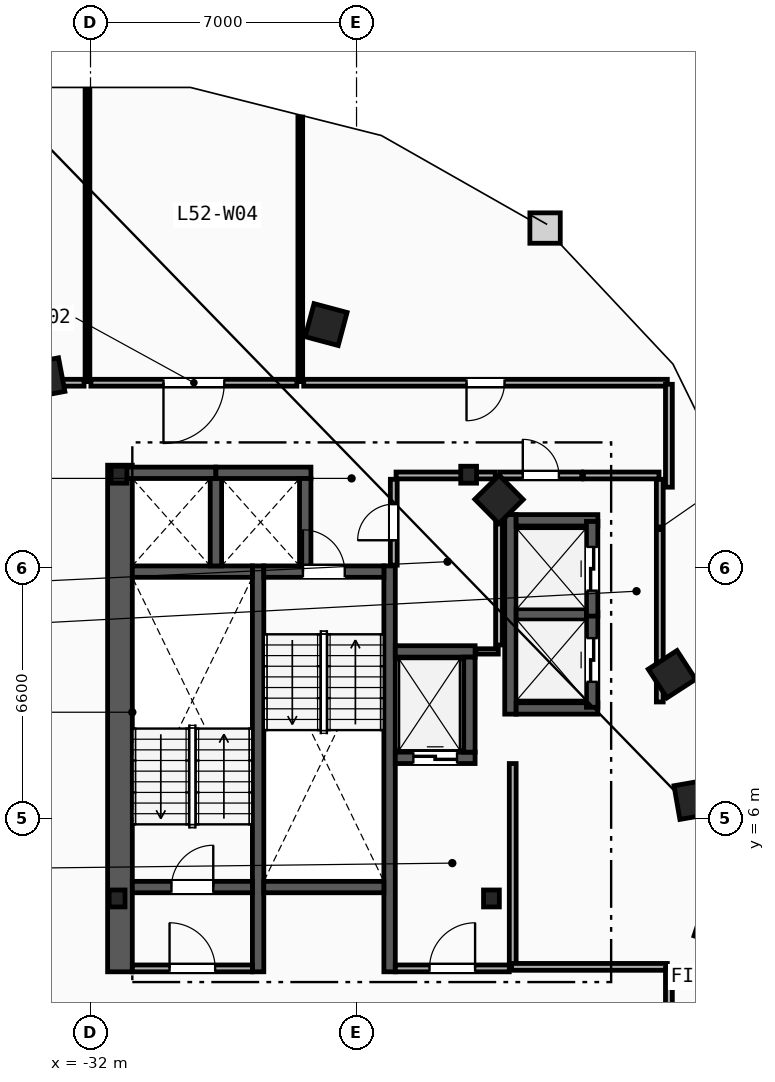
"""IFC4 building model, lengths in metres.
Left out: names, types, materials, properties, quantities, classifications, styles, units other than length and angle.
Written with IfcOpenShell. Run it as: python <this file> out.ifc"""

import sys

from ifc_helpers import new_model, si_unit, direction, frame, frame_2d, origin, origin_2d, place, context, subcontext, project, spatial, rectangle, i_section, extrude, element, fill, save


model = new_model("IFC4")
c1 = context("Model", 3, precision=1e-05, world=origin(), true_north=direction((0.0, 1.0)))
c2 = subcontext(c1, "Body", "Model", "MODEL_VIEW")
j1 = project(units=[si_unit("LENGTHUNIT", "METRE"), si_unit("PLANEANGLEUNIT", "RADIAN")], contexts=[c1])
p1 = place(None, origin())
s1 = spatial("IfcSite", under=j1, at=p1, CompositionType="ELEMENT")
p2 = place(p1, origin())
s2 = spatial("IfcBuilding", under=s1, at=p2, CompositionType="ELEMENT")
p3 = place(p2, frame((0.0, 0.0, 199.0)))
s3 = spatial("IfcBuildingStorey", under=s2, at=p3, CompositionType="ELEMENT", Elevation=199.0)
for number, where, z_axis, x_axis in (
    (1, (-31.3, 3.9, 0.0), (0.0, 0.0, 1.0), (1.0, 0.0, 0.0)),
    (2, (-21.45, 3.9, 0.0), (0.0, 0.0, 1.0), (1.0, 0.0, 0.0)),
    (3, (-22.05, 15.05, 0.0), (0.0, 0.0, 1.0), (1.0, 0.0, 0.0)),
    (4, (-31.25, 15.05, 0.0), (0.0, 0.0, 1.0), (1.0, 0.0, 0.0)),
):
    element("IfcColumn", number, at=place(p3, frame(where, z_axis=z_axis, x_axis=x_axis)), inside=s3, PredefinedType="COLUMN", context=c2, shape_type="SweptSolid", body=[
        extrude(i_section(OverallWidth=0.416, OverallDepth=0.446, WebThickness=0.039, FlangeThickness=0.063, FilletRadius=0.018, at=origin_2d()), origin(), (0.0, 0.0, 1.0), 3.6),
    ])
for number, where, z_axis, x_axis in (
    (5, (-15.55, 3.2, 0.0), (0.0, 0.0, 1.0), (0.315, 0.949, 0.0)),
    (6, (-16.125, 6.5, 0.0), (0.0, 0.0, 1.0), (-0.172, 0.985, 0.0)),
    (7, (-16.7, 9.8, 0.0), (0.0, 0.0, 1.0), (-0.544, 0.839, 0.0)),
    (8, (-21.25, 14.4, 0.0), (0.0, 0.0, 1.0), (-0.703, 0.711, 0.0)),
    (9, (-25.8, 19.0, 0.0), (0.0, 0.0, 1.0), (-0.966, 0.259, 0.0)),
    (10, (-33.2, 17.6, 0.0), (0.0, 0.0, 1.0), (-0.983, -0.186, 0.0)),
):
    element("IfcColumn", number, at=place(p3, frame(where, z_axis=z_axis, x_axis=x_axis)), inside=s3, PredefinedType="COLUMN", context=c2, shape_type="SweptSolid", body=[
        extrude(rectangle(XDim=0.9, YDim=0.9, at=origin_2d()), origin(), (0.0, 0.0, 1.0), 3.6),
    ])
p4 = place(p3, frame((-31.225, 1.97, 0.0), z_axis=(0.0, 0.0, 1.0), x_axis=(0.0, 1.0, 0.0)))
e11 = element("IfcWall", 11, at=p4, inside=s3, PredefinedType="SHEAR", context=c2, shape_type="SweptSolid", body=[
    extrude(rectangle(XDim=13.33, YDim=0.65, at=frame_2d((6.665, 0.0))), origin(), (0.0, 0.0, 1.0), 3.34),
])
for number, where, z_axis, x_axis in (
    (12, (-27.59, 1.97, 0.0), (0.0, 0.0, 1.0), (0.0, 1.0, 0.0)),
    (13, (-24.13, 1.97, 0.0), (0.0, 0.0, 1.0), (0.0, 1.0, 0.0)),
):
    element("IfcWall", number, at=place(p3, frame(where, z_axis=z_axis, x_axis=x_axis)), inside=s3, PredefinedType="SHEAR", context=c2, shape_type="SweptSolid", body=[
        extrude(rectangle(XDim=10.68, YDim=0.3, at=frame_2d((5.34, 0.0))), origin(), (0.0, 0.0, 1.0), 3.34),
    ])
p5 = place(p3, frame((-30.9, 4.2, 0.0), z_axis=(0.0, 0.0, 1.0), x_axis=(1.0, 0.0, 0.0)))
e14 = element("IfcWall", 14, at=p5, inside=s3, PredefinedType="SHEAR", context=c2, shape_type="SweptSolid", body=[
    extrude(rectangle(XDim=3.16, YDim=0.3, at=frame_2d((1.58, 0.0))), origin(), (0.0, 0.0, 1.0), 3.34),
])
p6 = place(p5, frame((1.03, 0.0, 0.0)))
e15 = element("IfcOpeningElement", 15, at=p6, cuts=e14, PredefinedType="OPENING", context=c2, shape_type="SweptSolid", body=[
    extrude(rectangle(XDim=1.1, YDim=2.15, at=frame_2d((0.55, 1.075))), frame((0.0, 0.16, 0.0), z_axis=(0.0, -1.0, 0.0), x_axis=(1.0, 0.0, 0.0)), (0.0, 0.0, 1.0), 0.32),
])
p7 = place(p3, frame((-30.9, 12.5, 0.0), z_axis=(0.0, 0.0, 1.0), x_axis=(1.0, 0.0, 0.0)))
e16 = element("IfcWall", 16, at=p7, inside=s3, PredefinedType="SHEAR", context=c2, shape_type="SweptSolid", body=[
    extrude(rectangle(XDim=3.16, YDim=0.3, at=frame_2d((1.58, 0.0))), origin(), (0.0, 0.0, 1.0), 3.34),
])
p8 = place(p3, frame((-27.44, 12.5, 0.0), z_axis=(0.0, 0.0, 1.0), x_axis=(1.0, 0.0, 0.0)))
e17 = element("IfcWall", 17, at=p8, inside=s3, PredefinedType="SHEAR", context=c2, shape_type="SweptSolid", body=[
    extrude(rectangle(XDim=3.16, YDim=0.3, at=frame_2d((1.58, 0.0))), origin(), (0.0, 0.0, 1.0), 3.34),
])
p9 = place(p8, frame((1.03, 0.0, 0.0)))
e18 = element("IfcOpeningElement", 18, at=p9, cuts=e17, PredefinedType="OPENING", context=c2, shape_type="SweptSolid", body=[
    extrude(rectangle(XDim=1.1, YDim=2.15, at=frame_2d((0.55, 1.075))), frame((0.0, 0.16, 0.0), z_axis=(0.0, -1.0, 0.0), x_axis=(1.0, 0.0, 0.0)), (0.0, 0.0, 1.0), 0.32),
])
p10 = place(p3, frame((-27.44, 4.2, 0.0), z_axis=(0.0, 0.0, 1.0), x_axis=(1.0, 0.0, 0.0)))
e19 = element("IfcWall", 19, at=p10, inside=s3, PredefinedType="SHEAR", context=c2, shape_type="SweptSolid", body=[
    extrude(rectangle(XDim=3.16, YDim=0.3, at=frame_2d((1.58, 0.0))), origin(), (0.0, 0.0, 1.0), 3.34),
])
p11 = place(p3, frame((-20.89, 2.15, 0.0), z_axis=(0.0, 0.0, 1.0), x_axis=(0.0, 1.0, 0.0)))
e20 = element("IfcWall", 20, at=p11, inside=s3, PredefinedType="PARTITIONING", context=c2, shape_type="SweptSolid", body=[
    extrude(rectangle(XDim=5.3, YDim=0.18, at=frame_2d((2.65, 0.0))), origin(), (0.0, 0.0, 1.0), 3.34),
])
p12 = place(p3, frame((-23.98, 2.06, 0.0), z_axis=(0.0, 0.0, 1.0), x_axis=(1.0, 0.0, 0.0)))
e21 = element("IfcWall", 21, at=p12, inside=s3, PredefinedType="PARTITIONING", context=c2, shape_type="SweptSolid", body=[
    extrude(rectangle(XDim=3.0, YDim=0.18, at=frame_2d((1.5, 0.0))), origin(), (0.0, 0.0, 1.0), 3.34),
])
p13 = place(p12, frame((0.9, 0.0, 0.0)))
e22 = element("IfcOpeningElement", 22, at=p13, cuts=e21, PredefinedType="OPENING", context=c2, shape_type="SweptSolid", body=[
    extrude(rectangle(XDim=1.2, YDim=2.15, at=frame_2d((0.6, 1.075))), frame((0.0, 0.1, 0.0), z_axis=(0.0, -1.0, 0.0), x_axis=(1.0, 0.0, 0.0)), (0.0, 0.0, 1.0), 0.2),
])
p14 = place(p3, frame((-30.9, 2.06, 0.0), z_axis=(0.0, 0.0, 1.0), x_axis=(1.0, 0.0, 0.0)))
e23 = element("IfcWall", 23, at=p14, inside=s3, PredefinedType="PARTITIONING", context=c2, shape_type="SweptSolid", body=[
    extrude(rectangle(XDim=3.16, YDim=0.18, at=frame_2d((1.58, 0.0))), origin(), (0.0, 0.0, 1.0), 3.34),
])
p15 = place(p14, frame((0.98, 0.0, 0.0)))
e24 = element("IfcOpeningElement", 24, at=p15, cuts=e23, PredefinedType="OPENING", context=c2, shape_type="SweptSolid", body=[
    extrude(rectangle(XDim=1.2, YDim=2.15, at=frame_2d((0.6, 1.075))), frame((0.0, 0.1, 0.0), z_axis=(0.0, -1.0, 0.0), x_axis=(1.0, 0.0, 0.0)), (0.0, 0.0, 1.0), 0.2),
])
p16 = place(p3, frame((-23.98, 7.6, 0.0), z_axis=(0.0, 0.0, 1.0), x_axis=(1.0, 0.0, 0.0)))
e25 = element("IfcWall", 25, at=p16, inside=s3, PredefinedType="SHEAR", context=c2, shape_type="SweptSolid", body=[
    extrude(rectangle(XDim=2.1, YDim=0.3, at=frame_2d((1.05, 0.0))), origin(), (0.0, 0.0, 1.0), 3.34),
])
p17 = place(p16, frame((0.475, 0.0, 0.0)))
e26 = element("IfcOpeningElement", 26, at=p17, cuts=e25, PredefinedType="OPENING", context=c2, shape_type="SweptSolid", body=[
    extrude(rectangle(XDim=1.15, YDim=2.2, at=frame_2d((0.575, 1.1))), frame((0.0, 0.16, 0.0), z_axis=(0.0, -1.0, 0.0), x_axis=(1.0, 0.0, 0.0)), (0.0, 0.0, 1.0), 0.32),
])
p18 = place(p3, frame((-23.98, 10.4, 0.0), z_axis=(0.0, 0.0, 1.0), x_axis=(1.0, 0.0, 0.0)))
e27 = element("IfcWall", 27, at=p18, inside=s3, PredefinedType="SHEAR", context=c2, shape_type="SweptSolid", body=[
    extrude(rectangle(XDim=2.1, YDim=0.3, at=frame_2d((1.05, 0.0))), origin(), (0.0, 0.0, 1.0), 3.34),
])
for number, where, z_axis, x_axis in (
    (28, (-22.03, 7.75, 0.0), (0.0, 0.0, 1.0), (0.0, 1.0, 0.0)),
    (29, (-31.2, 15.1, 0.0), (0.0, 0.0, 1.0), (1.0, 0.0, 0.0)),
):
    element("IfcWall", number, at=place(p3, frame(where, z_axis=z_axis, x_axis=x_axis)), inside=s3, PredefinedType="SHEAR", context=c2, shape_type="SweptSolid", body=[
        extrude(rectangle(XDim=2.5, YDim=0.3, at=frame_2d((1.25, 0.0))), origin(), (0.0, 0.0, 1.0), 3.34),
    ])
p19 = place(p3, frame((-28.7, 12.65, 0.0), z_axis=(0.0, 0.0, 1.0), x_axis=(0.0, 1.0, 0.0)))
e30 = element("IfcWall", 30, at=p19, inside=s3, PredefinedType="SHEAR", context=c2, shape_type="SweptSolid", body=[
    extrude(rectangle(XDim=2.3, YDim=0.3, at=frame_2d((1.15, 0.0))), origin(), (0.0, 0.0, 1.0), 3.34),
])
p20 = place(p3, frame((-28.7, 15.1, 0.0), z_axis=(0.0, 0.0, 1.0), x_axis=(1.0, 0.0, 0.0)))
e31 = element("IfcWall", 31, at=p20, inside=s3, PredefinedType="SHEAR", context=c2, shape_type="SweptSolid", body=[
    extrude(rectangle(XDim=2.5, YDim=0.3, at=frame_2d((1.25, 0.0))), origin(), (0.0, 0.0, 1.0), 3.34),
])
p21 = place(p3, frame((-26.35, 12.65, 0.0), z_axis=(0.0, 0.0, 1.0), x_axis=(0.0, 1.0, 0.0)))
e32 = element("IfcWall", 32, at=p21, inside=s3, PredefinedType="SHEAR", context=c2, shape_type="SweptSolid", body=[
    extrude(rectangle(XDim=2.3, YDim=0.3, at=frame_2d((1.15, 0.0))), origin(), (0.0, 0.0, 1.0), 3.34),
])
p22 = place(p3, frame((-20.95, 8.75, 0.0), z_axis=(0.0, 0.0, 1.0), x_axis=(0.0, 1.0, 0.0)))
e33 = element("IfcWall", 33, at=p22, inside=s3, PredefinedType="SHEAR", context=c2, shape_type="SweptSolid", body=[
    extrude(rectangle(XDim=5.25, YDim=0.3, at=frame_2d((2.625, 0.0))), origin(), (0.0, 0.0, 1.0), 3.34),
])
for number, where, z_axis, x_axis in (
    (34, (-20.8, 8.9, 0.0), (0.0, 0.0, 1.0), (1.0, 0.0, 0.0)),
    (35, (-20.8, 13.85, 0.0), (0.0, 0.0, 1.0), (1.0, 0.0, 0.0)),
):
    element("IfcWall", number, at=place(p3, frame(where, z_axis=z_axis, x_axis=x_axis)), inside=s3, PredefinedType="SHEAR", context=c2, shape_type="SweptSolid", body=[
        extrude(rectangle(XDim=2.15, YDim=0.3, at=frame_2d((1.075, 0.0))), origin(), (0.0, 0.0, 1.0), 3.34),
    ])
p23 = place(p3, frame((-20.8, 11.375, 0.0), z_axis=(0.0, 0.0, 1.0), x_axis=(1.0, 0.0, 0.0)))
e36 = element("IfcWall", 36, at=p23, inside=s3, PredefinedType="SHEAR", context=c2, shape_type="SweptSolid", body=[
    extrude(rectangle(XDim=1.85, YDim=0.3, at=frame_2d((0.925, 0.0))), origin(), (0.0, 0.0, 1.0), 3.34),
])
p24 = place(p3, frame((-18.8, 8.93, 0.0), z_axis=(0.0, 0.0, 1.0), x_axis=(0.0, 1.0, 0.0)))
e37 = element("IfcWall", 37, at=p24, inside=s3, PredefinedType="SHEAR", context=c2, shape_type="SweptSolid", body=[
    extrude(rectangle(XDim=2.49, YDim=0.3, at=frame_2d((1.245, 0.0))), origin(), (0.0, 0.0, 1.0), 3.34),
])
p25 = place(p24, frame((0.67, 0.0, 0.0)))
e38 = element("IfcOpeningElement", 38, at=p25, cuts=e37, PredefinedType="OPENING", context=c2, shape_type="SweptSolid", body=[
    extrude(rectangle(XDim=1.15, YDim=2.2, at=frame_2d((0.575, 1.1))), frame((0.0, 0.16, 0.0), z_axis=(0.0, -1.0, 0.0), x_axis=(1.0, 0.0, 0.0)), (0.0, 0.0, 1.0), 0.32),
])
p26 = place(p3, frame((-18.8, 11.33, 0.0), z_axis=(0.0, 0.0, 1.0), x_axis=(0.0, 1.0, 0.0)))
e39 = element("IfcWall", 39, at=p26, inside=s3, PredefinedType="SHEAR", context=c2, shape_type="SweptSolid", body=[
    extrude(rectangle(XDim=2.49, YDim=0.3, at=frame_2d((1.245, 0.0))), origin(), (0.0, 0.0, 1.0), 3.34),
])
p27 = place(p26, frame((0.67, 0.0, 0.0)))
e40 = element("IfcOpeningElement", 40, at=p27, cuts=e39, PredefinedType="OPENING", context=c2, shape_type="SweptSolid", body=[
    extrude(rectangle(XDim=1.15, YDim=2.2, at=frame_2d((0.575, 1.1))), frame((0.0, 0.16, 0.0), z_axis=(0.0, -1.0, 0.0), x_axis=(1.0, 0.0, 0.0)), (0.0, 0.0, 1.0), 0.32),
])
p28 = place(p3, frame((-17.02, 9.07, 0.0), z_axis=(0.0, 0.0, 1.0), x_axis=(0.0, 1.0, 0.0)))
e41 = element("IfcWall", 41, at=p28, inside=s3, PredefinedType="PARTITIONING", context=c2, shape_type="SweptSolid", body=[
    extrude(rectangle(XDim=5.86, YDim=0.18, at=frame_2d((2.93, 0.0))), origin(), (0.0, 0.0, 1.0), 3.34),
])
p29 = place(p3, frame((-21.23, 15.03, 0.0), z_axis=(0.0, 0.0, 1.0), x_axis=(1.0, 0.0, 0.0)))
e42 = element("IfcWall", 42, at=p29, inside=s3, PredefinedType="PARTITIONING", context=c2, shape_type="SweptSolid", body=[
    extrude(rectangle(XDim=2.16, YDim=0.18, at=frame_2d((1.08, 0.0))), origin(), (0.0, 0.0, 1.0), 3.34),
])
p30 = place(p29, frame((0.605, 0.0, 0.0)))
e43 = element("IfcOpeningElement", 43, at=p30, cuts=e42, PredefinedType="OPENING", context=c2, shape_type="SweptSolid", body=[
    extrude(rectangle(XDim=0.95, YDim=2.1, at=frame_2d((0.475, 1.05))), frame((0.0, 0.1, 0.0), z_axis=(0.0, -1.0, 0.0), x_axis=(1.0, 0.0, 0.0)), (0.0, 0.0, 1.0), 0.2),
])
p31 = place(p3, frame((-19.03, 15.03, 0.0), z_axis=(0.0, 0.0, 1.0), x_axis=(1.0, 0.0, 0.0)))
e44 = element("IfcWall", 44, at=p31, inside=s3, PredefinedType="PARTITIONING", context=c2, shape_type="SweptSolid", body=[
    extrude(rectangle(XDim=1.99, YDim=0.18, at=frame_2d((0.995, 0.0))), origin(), (0.0, 0.0, 1.0), 3.34),
])
p32 = place(p3, frame((-21.86, 10.4, 0.0), z_axis=(0.0, 0.0, 1.0), x_axis=(1.0, 0.0, 0.0)))
e45 = element("IfcWall", 45, at=p32, inside=s3, PredefinedType="PARTITIONING", context=c2, shape_type="SweptSolid", body=[
    extrude(rectangle(XDim=0.59, YDim=0.14, at=frame_2d((0.295, 0.0))), origin(), (0.0, 0.0, 1.0), 3.34),
])
p33 = place(p3, frame((-21.25, 10.57, 0.0), z_axis=(0.0, 0.0, 1.0), x_axis=(0.0, 1.0, 0.0)))
e46 = element("IfcWall", 46, at=p33, inside=s3, PredefinedType="PARTITIONING", context=c2, shape_type="SweptSolid", body=[
    extrude(rectangle(XDim=4.36, YDim=0.18, at=frame_2d((2.18, 0.0))), origin(), (0.0, 0.0, 1.0), 3.34),
])
p34 = place(p3, frame((-23.96, 15.03, 0.0), z_axis=(0.0, 0.0, 1.0), x_axis=(1.0, 0.0, 0.0)))
e47 = element("IfcWall", 47, at=p34, inside=s3, PredefinedType="PARTITIONING", context=c2, shape_type="SweptSolid", body=[
    extrude(rectangle(XDim=2.61, YDim=0.18, at=frame_2d((1.305, 0.0))), origin(), (0.0, 0.0, 1.0), 2.413),
])
p35 = place(p3, frame((-24.02, 12.67, 0.0), z_axis=(0.0, 0.0, 1.0), x_axis=(0.0, 1.0, 0.0)))
e48 = element("IfcWall", 48, at=p35, inside=s3, PredefinedType="PARTITIONING", context=c2, shape_type="SweptSolid", body=[
    extrude(rectangle(XDim=2.26, YDim=0.18, at=frame_2d((1.13, 0.0))), origin(), (0.0, 0.0, 1.0), 3.34),
])
p36 = place(p35, frame((0.655, 0.0, 0.0)))
e49 = element("IfcOpeningElement", 49, at=p36, cuts=e48, PredefinedType="OPENING", context=c2, shape_type="SweptSolid", body=[
    extrude(rectangle(XDim=0.95, YDim=2.1, at=frame_2d((0.475, 1.05))), frame((0.0, 0.1, 0.0), z_axis=(0.0, -1.0, 0.0), x_axis=(1.0, 0.0, 0.0)), (0.0, 0.0, 1.0), 0.2),
])
p37 = place(p3, frame((-32.08, 17.5, 0.0), z_axis=(0.0, 0.0, 1.0), x_axis=(0.0, 1.0, 0.0)))
e50 = element("IfcWall", 50, at=p37, inside=s3, PredefinedType="PARTITIONING", context=c2, shape_type="SweptSolid", body=[
    extrude(rectangle(XDim=7.69, YDim=0.125, at=frame_2d((3.845, 0.0))), origin(), (0.0, 0.0, 1.0), 3.34),
])
p38 = place(p3, frame((-26.48, 17.5, 0.0), z_axis=(0.0, 0.0, 1.0), x_axis=(0.0, 1.0, 0.0)))
e51 = element("IfcWall", 51, at=p38, inside=s3, PredefinedType="PARTITIONING", context=c2, shape_type="SweptSolid", body=[
    extrude(rectangle(XDim=6.961, YDim=0.125, at=frame_2d((3.48, 0.0))), origin(), (0.0, 0.0, 1.0), 3.34),
])
p39 = place(p3, frame((-16.822, 17.47, 0.0), z_axis=(0.0, 0.0, 1.0), x_axis=(-1.0, 0.0, 0.0)))
e52 = element("IfcWall", 52, at=p39, inside=s3, PredefinedType="PARTITIONING", context=c2, shape_type="SweptSolid", body=[
    extrude(rectangle(XDim=9.568, YDim=0.18, at=frame_2d((4.784, 0.0))), origin(), (0.0, 0.0, 1.0), 3.34),
])
p40 = place(p39, frame((4.284, 0.0, 0.0)))
e53 = element("IfcOpeningElement", 53, at=p40, cuts=e52, PredefinedType="OPENING", context=c2, shape_type="SweptSolid", body=[
    extrude(rectangle(XDim=1.0, YDim=2.15, at=frame_2d((0.5, 1.075))), frame((0.0, 0.1, 0.0), z_axis=(0.0, -1.0, 0.0), x_axis=(1.0, 0.0, 0.0)), (0.0, 0.0, 1.0), 0.2),
])
p41 = place(p3, frame((-16.822, 2.1, 0.0), z_axis=(0.0, 0.0, 1.0), x_axis=(-1.0, 0.0, 0.0)))
e54 = element("IfcWall", 54, at=p41, inside=s3, PredefinedType="PARTITIONING", context=c2, shape_type="SweptSolid", body=[
    extrude(rectangle(XDim=4.098, YDim=0.18, at=frame_2d((2.049, 0.0))), origin(), (0.0, 0.0, 1.0), 3.34),
])
p42 = place(p3, frame((-16.78, 14.721, 0.0), z_axis=(0.0, 0.0, 1.0), x_axis=(0.0, 1.0, 0.0)))
e55 = element("IfcWall", 55, at=p42, inside=s3, PredefinedType="PARTITIONING", context=c2, shape_type="SweptSolid", body=[
    extrude(rectangle(XDim=2.707, YDim=0.18, at=frame_2d((1.354, 0.0))), origin(), (0.0, 0.0, 1.0), 3.34),
])
p43 = place(p3, frame((-16.78, -0.329, 0.0), z_axis=(0.0, 0.0, 1.0), x_axis=(0.0, 1.0, 0.0)))
e56 = element("IfcWall", 56, at=p43, inside=s3, PredefinedType="PARTITIONING", context=c2, shape_type="SweptSolid", body=[
    extrude(rectangle(XDim=2.387, YDim=0.18, at=frame_2d((1.194, 0.0))), origin(), (0.0, 0.0, 1.0), 3.34),
])
p44 = place(p3, frame((-32.17, 17.47, 0.0), z_axis=(0.0, 0.0, 1.0), x_axis=(-1.0, 0.0, 0.0)))
e57 = element("IfcWall", 57, at=p44, inside=s3, PredefinedType="PARTITIONING", context=c2, shape_type="SweptSolid", body=[
    extrude(rectangle(XDim=1.458, YDim=0.18, at=frame_2d((0.729, 0.0))), origin(), (0.0, 0.0, 1.0), 3.34),
])
p45 = place(p3, frame((-26.57, 17.47, 0.0), z_axis=(0.0, 0.0, 1.0), x_axis=(-1.0, 0.0, 0.0)))
e58 = element("IfcWall", 58, at=p45, inside=s3, PredefinedType="PARTITIONING", context=c2, shape_type="SweptSolid", body=[
    extrude(rectangle(XDim=5.42, YDim=0.18, at=frame_2d((2.71, 0.0))), origin(), (0.0, 0.0, 1.0), 3.34),
])
p46 = place(p45, frame((1.91, 0.0, 0.0)))
e59 = element("IfcOpeningElement", 59, at=p46, cuts=e58, PredefinedType="OPENING", context=c2, shape_type="SweptSolid", body=[
    extrude(rectangle(XDim=1.6, YDim=2.2, at=frame_2d((0.8, 1.1))), frame((0.0, 0.1, 0.0), z_axis=(0.0, -1.0, 0.0), x_axis=(1.0, 0.0, 0.0)), (0.0, 0.0, 1.0), 0.2),
])
p47 = place(p6, origin())
e60 = element("IfcDoor", 60, at=p47, inside=s3, OperationType="SINGLE_SWING_RIGHT", PredefinedType="DOOR", context=c2, shape_type="SweptSolid", body=[
    extrude(rectangle(XDim=1.1, YDim=2.15, at=frame_2d((0.55, 1.075))), frame((0.0, 0.025, 0.0), z_axis=(0.0, -1.0, 0.0), x_axis=(1.0, 0.0, 0.0)), (0.0, 0.0, 1.0), 0.05),
])
fill(e15, e60)
p48 = place(p9, origin())
e61 = element("IfcDoor", 61, at=p48, inside=s3, OperationType="SINGLE_SWING_LEFT", PredefinedType="DOOR", context=c2, shape_type="SweptSolid", body=[
    extrude(rectangle(XDim=1.1, YDim=2.15, at=frame_2d((0.55, 1.075))), frame((0.0, 0.025, 0.0), z_axis=(0.0, -1.0, 0.0), x_axis=(1.0, 0.0, 0.0)), (0.0, 0.0, 1.0), 0.05),
])
fill(e18, e61)
p49 = place(p13, origin())
e62 = element("IfcDoor", 62, at=p49, inside=s3, OperationType="SINGLE_SWING_RIGHT", PredefinedType="DOOR", context=c2, shape_type="SweptSolid", body=[
    extrude(rectangle(XDim=1.2, YDim=2.15, at=frame_2d((0.6, 1.075))), frame((0.0, 0.025, 0.0), z_axis=(0.0, -1.0, 0.0), x_axis=(1.0, 0.0, 0.0)), (0.0, 0.0, 1.0), 0.05),
])
fill(e22, e62)
p50 = place(p15, origin())
e63 = element("IfcDoor", 63, at=p50, inside=s3, OperationType="SINGLE_SWING_LEFT", PredefinedType="DOOR", context=c2, shape_type="SweptSolid", body=[
    extrude(rectangle(XDim=1.2, YDim=2.15, at=frame_2d((0.6, 1.075))), frame((0.0, 0.025, 0.0), z_axis=(0.0, -1.0, 0.0), x_axis=(1.0, 0.0, 0.0)), (0.0, 0.0, 1.0), 0.05),
])
fill(e24, e63)
p51 = place(p17, origin())
e64 = element("IfcDoor", 64, at=p51, inside=s3, OperationType="SLIDING_TO_LEFT", PredefinedType="TRAPDOOR", context=c2, shape_type="SweptSolid", body=[
    extrude(rectangle(XDim=1.15, YDim=2.2, at=frame_2d((0.575, 1.1))), frame((0.0, 0.025, 0.0), z_axis=(0.0, -1.0, 0.0), x_axis=(1.0, 0.0, 0.0)), (0.0, 0.0, 1.0), 0.05),
])
fill(e26, e64)
p52 = place(p25, origin())
e65 = element("IfcDoor", 65, at=p52, inside=s3, OperationType="SLIDING_TO_LEFT", PredefinedType="TRAPDOOR", context=c2, shape_type="SweptSolid", body=[
    extrude(rectangle(XDim=1.15, YDim=2.2, at=frame_2d((0.575, 1.1))), frame((0.0, 0.025, 0.0), z_axis=(0.0, -1.0, 0.0), x_axis=(1.0, 0.0, 0.0)), (0.0, 0.0, 1.0), 0.05),
])
fill(e38, e65)
p53 = place(p27, origin())
e66 = element("IfcDoor", 66, at=p53, inside=s3, OperationType="SLIDING_TO_LEFT", PredefinedType="TRAPDOOR", context=c2, shape_type="SweptSolid", body=[
    extrude(rectangle(XDim=1.15, YDim=2.2, at=frame_2d((0.575, 1.1))), frame((0.0, 0.025, 0.0), z_axis=(0.0, -1.0, 0.0), x_axis=(1.0, 0.0, 0.0)), (0.0, 0.0, 1.0), 0.05),
])
fill(e40, e66)
p54 = place(p40, origin())
e67 = element("IfcDoor", 67, at=p54, inside=s3, OperationType="SINGLE_SWING_RIGHT", PredefinedType="DOOR", context=c2, shape_type="SweptSolid", body=[
    extrude(rectangle(XDim=1.0, YDim=2.15, at=frame_2d((0.5, 1.075))), frame((0.0, 0.025, 0.0), z_axis=(0.0, -1.0, 0.0), x_axis=(1.0, 0.0, 0.0)), (0.0, 0.0, 1.0), 0.05),
])
fill(e53, e67)
p55 = place(p46, origin())
e68 = element("IfcDoor", 68, at=p55, inside=s3, OperationType="SINGLE_SWING_RIGHT", PredefinedType="DOOR", context=c2, shape_type="SweptSolid", body=[
    extrude(rectangle(XDim=1.6, YDim=2.2, at=frame_2d((0.8, 1.1))), frame((0.0, 0.025, 0.0), z_axis=(0.0, -1.0, 0.0), x_axis=(1.0, 0.0, 0.0)), (0.0, 0.0, 1.0), 0.05),
])
fill(e59, e68)
p56 = place(p36, origin())
e69 = element("IfcDoor", 69, at=p56, inside=s3, OperationType="SINGLE_SWING_LEFT", PredefinedType="DOOR", context=c2, shape_type="SweptSolid", body=[
    extrude(rectangle(XDim=0.95, YDim=2.1, at=frame_2d((0.475, 1.05))), frame((0.0, 0.025, 0.0), z_axis=(0.0, -1.0, 0.0), x_axis=(1.0, 0.0, 0.0)), (0.0, 0.0, 1.0), 0.05),
])
fill(e49, e69)
p57 = place(p30, origin())
e70 = element("IfcDoor", 70, at=p57, inside=s3, OperationType="SINGLE_SWING_LEFT", PredefinedType="DOOR", context=c2, shape_type="SweptSolid", body=[
    extrude(rectangle(XDim=0.95, YDim=2.1, at=frame_2d((0.475, 1.05))), frame((0.0, 0.025, 0.0), z_axis=(0.0, -1.0, 0.0), x_axis=(1.0, 0.0, 0.0)), (0.0, 0.0, 1.0), 0.05),
])
fill(e43, e70)
save(model, sys.argv[1])
